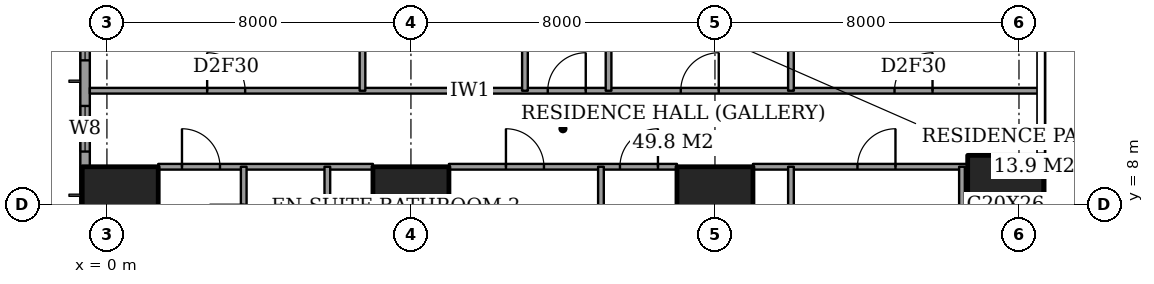
"""IFC4 building model, lengths in metres.
Left out: names, types, materials, properties, quantities, classifications, styles, units other than length and angle.
Written with IfcOpenShell. Run it as: python <this file> out.ifc"""

import sys

from ifc_helpers import new_model, si_unit, direction, frame, frame_2d, origin, origin_2d, place, context, subcontext, project, spatial, rectangle, extrude, element, fill, save


model = new_model("IFC4")
c1 = context("Model", 3, precision=1e-05, world=origin(), true_north=direction((0.0, 1.0)))
c2 = subcontext(c1, "Body", "Model", "MODEL_VIEW")
j1 = project(units=[si_unit("LENGTHUNIT", "METRE"), si_unit("PLANEANGLEUNIT", "RADIAN")], contexts=[c1])
p1 = place(None, origin())
s1 = spatial("IfcSite", under=j1, at=p1, CompositionType="ELEMENT")
p2 = place(p1, origin())
s2 = spatial("IfcBuilding", under=s1, at=p2, CompositionType="ELEMENT")
p3 = place(p2, frame((0.0, 0.0, 76.4)))
s3 = spatial("IfcBuildingStorey", under=s2, at=p3, CompositionType="ELEMENT", Elevation=76.4)
for number, where, z_axis, x_axis in (
    (1, (0.35, 8.0, 0.0), (0.0, 0.0, 1.0), (1.0, 0.0, 0.0)),
    (2, (8.0, 8.0, 0.0), (0.0, 0.0, 1.0), (1.0, 0.0, 0.0)),
    (3, (16.0, 8.0, 0.0), (0.0, 0.0, 1.0), (1.0, 0.0, 0.0)),
):
    element("IfcColumn", number, at=place(p3, frame(where, z_axis=z_axis, x_axis=x_axis)), inside=s3, PredefinedType="COLUMN", context=c2, shape_type="SweptSolid", body=[
        extrude(rectangle(XDim=2.0, YDim=2.0, at=origin_2d()), origin(), (0.0, 0.0, 1.0), 3.6),
    ])
p4 = place(p3, frame((23.65, 8.0, 0.0), z_axis=(0.0, 0.0, 1.0), x_axis=(1.0, 0.0, 0.0)))
e4 = element("IfcColumn", 4, at=p4, inside=s3, PredefinedType="COLUMN", context=c2, shape_type="SweptSolid", body=[
    extrude(rectangle(XDim=2.0, YDim=2.6, at=origin_2d()), origin(), (0.0, 0.0, 1.0), 3.6),
])
p5 = place(p3, frame((-0.575, 44.825, 0.0), z_axis=(0.0, 0.0, 1.0), x_axis=(0.0, -1.0, 0.0)))
e5 = element("IfcWall", 5, at=p5, inside=s3, PredefinedType="SOLIDWALL", context=c2, shape_type="SweptSolid", body=[
    extrude(rectangle(XDim=41.65, YDim=0.25, at=frame_2d((20.825, 0.0))), origin(), (0.0, 0.0, 1.0), 3.6),
])
p6 = place(p5, frame((0.775, 0.0, 0.6)))
e6 = element("IfcOpeningElement", 6, at=p6, cuts=e5, PredefinedType="OPENING", context=c2, shape_type="SweptSolid", body=[
    extrude(rectangle(XDim=2.4, YDim=2.0, at=frame_2d((1.2, 1.0))), frame((0.0, 0.135, 0.0), z_axis=(0.0, -1.0, 0.0), x_axis=(1.0, 0.0, 0.0)), (0.0, 0.0, 1.0), 0.27),
])
p7 = place(p5, frame((6.1, 0.0, 0.6)))
e7 = element("IfcOpeningElement", 7, at=p7, cuts=e5, PredefinedType="OPENING", context=c2, shape_type="SweptSolid", body=[
    extrude(rectangle(XDim=1.2, YDim=2.0, at=frame_2d((0.6, 1.0))), frame((0.0, 0.135, 0.0), z_axis=(0.0, -1.0, 0.0), x_axis=(1.0, 0.0, 0.0)), (0.0, 0.0, 1.0), 0.27),
])
p8 = place(p5, frame((8.425, 0.0, 0.6)))
e8 = element("IfcOpeningElement", 8, at=p8, cuts=e5, PredefinedType="OPENING", context=c2, shape_type="SweptSolid", body=[
    extrude(rectangle(XDim=2.4, YDim=2.0, at=frame_2d((1.2, 1.0))), frame((0.0, 0.135, 0.0), z_axis=(0.0, -1.0, 0.0), x_axis=(1.0, 0.0, 0.0)), (0.0, 0.0, 1.0), 0.27),
])
p9 = place(p5, frame((15.625, 0.0, 0.6)))
e9 = element("IfcOpeningElement", 9, at=p9, cuts=e5, PredefinedType="OPENING", context=c2, shape_type="SweptSolid", body=[
    extrude(rectangle(XDim=2.4, YDim=2.0, at=frame_2d((1.2, 1.0))), frame((0.0, 0.135, 0.0), z_axis=(0.0, -1.0, 0.0), x_axis=(1.0, 0.0, 0.0)), (0.0, 0.0, 1.0), 0.27),
])
p10 = place(p5, frame((23.625, 0.0, 0.6)))
e10 = element("IfcOpeningElement", 10, at=p10, cuts=e5, PredefinedType="OPENING", context=c2, shape_type="SweptSolid", body=[
    extrude(rectangle(XDim=2.4, YDim=2.0, at=frame_2d((1.2, 1.0))), frame((0.0, 0.135, 0.0), z_axis=(0.0, -1.0, 0.0), x_axis=(1.0, 0.0, 0.0)), (0.0, 0.0, 1.0), 0.27),
])
p11 = place(p5, frame((30.625, 0.0, 0.6)))
e11 = element("IfcOpeningElement", 11, at=p11, cuts=e5, PredefinedType="OPENING", context=c2, shape_type="SweptSolid", body=[
    extrude(rectangle(XDim=2.4, YDim=2.0, at=frame_2d((1.2, 1.0))), frame((0.0, 0.135, 0.0), z_axis=(0.0, -1.0, 0.0), x_axis=(1.0, 0.0, 0.0)), (0.0, 0.0, 1.0), 0.27),
])
p12 = place(p5, frame((34.225, 0.0, 0.6)))
e12 = element("IfcOpeningElement", 12, at=p12, cuts=e5, PredefinedType="OPENING", context=c2, shape_type="SweptSolid", body=[
    extrude(rectangle(XDim=1.2, YDim=2.0, at=frame_2d((0.6, 1.0))), frame((0.0, 0.135, 0.0), z_axis=(0.0, -1.0, 0.0), x_axis=(1.0, 0.0, 0.0)), (0.0, 0.0, 1.0), 0.27),
])
p13 = place(p5, frame((38.475, 0.0, 0.6)))
e13 = element("IfcOpeningElement", 13, at=p13, cuts=e5, PredefinedType="OPENING", context=c2, shape_type="SweptSolid", body=[
    extrude(rectangle(XDim=2.4, YDim=2.0, at=frame_2d((1.2, 1.0))), frame((0.0, 0.135, 0.0), z_axis=(0.0, -1.0, 0.0), x_axis=(1.0, 0.0, 0.0)), (0.0, 0.0, 1.0), 0.27),
])
p14 = place(p3, frame((1.35, 9.0, 0.0), z_axis=(0.0, 0.0, 1.0), x_axis=(1.0, 0.0, 0.0)))
e14 = element("IfcWall", 14, at=p14, inside=s3, PredefinedType="PARTITIONING", context=c2, shape_type="SweptSolid", body=[
    extrude(rectangle(XDim=5.65, YDim=0.15, at=frame_2d((2.825, 0.0))), origin(), (0.0, 0.0, 1.0), 3.35),
])
p15 = place(p14, frame((0.625, 0.0, 0.0)))
e15 = element("IfcOpeningElement", 15, at=p15, cuts=e14, PredefinedType="OPENING", context=c2, shape_type="SweptSolid", body=[
    extrude(rectangle(XDim=1.0, YDim=2.1, at=frame_2d((0.5, 1.05))), frame((0.0, 0.085, 0.0), z_axis=(0.0, -1.0, 0.0), x_axis=(1.0, 0.0, 0.0)), (0.0, 0.0, 1.0), 0.17),
])
p16 = place(p3, frame((9.0, 9.0, 0.0), z_axis=(0.0, 0.0, 1.0), x_axis=(1.0, 0.0, 0.0)))
e16 = element("IfcWall", 16, at=p16, inside=s3, PredefinedType="PARTITIONING", context=c2, shape_type="SweptSolid", body=[
    extrude(rectangle(XDim=6.0, YDim=0.15, at=frame_2d((3.0, 0.0))), origin(), (0.0, 0.0, 1.0), 3.35),
])
p17 = place(p16, frame((1.5, 0.0, 0.0)))
e17 = element("IfcOpeningElement", 17, at=p17, cuts=e16, PredefinedType="OPENING", context=c2, shape_type="SweptSolid", body=[
    extrude(rectangle(XDim=1.0, YDim=2.1, at=frame_2d((0.5, 1.05))), frame((0.0, 0.085, 0.0), z_axis=(0.0, -1.0, 0.0), x_axis=(1.0, 0.0, 0.0)), (0.0, 0.0, 1.0), 0.17),
])
p18 = place(p16, frame((4.5, 0.0, 0.0)))
e18 = element("IfcOpeningElement", 18, at=p18, cuts=e16, PredefinedType="OPENING", context=c2, shape_type="SweptSolid", body=[
    extrude(rectangle(XDim=1.0, YDim=2.1, at=frame_2d((0.5, 1.05))), frame((0.0, 0.085, 0.0), z_axis=(0.0, -1.0, 0.0), x_axis=(1.0, 0.0, 0.0)), (0.0, 0.0, 1.0), 0.17),
])
p19 = place(p3, frame((17.0, 9.0, 0.0), z_axis=(0.0, 0.0, 1.0), x_axis=(1.0, 0.0, 0.0)))
e19 = element("IfcWall", 19, at=p19, inside=s3, PredefinedType="PARTITIONING", context=c2, shape_type="SweptSolid", body=[
    extrude(rectangle(XDim=5.65, YDim=0.15, at=frame_2d((2.825, 0.0))), origin(), (0.0, 0.0, 1.0), 3.35),
])
p20 = place(p19, frame((2.75, 0.0, 0.0)))
e20 = element("IfcOpeningElement", 20, at=p20, cuts=e19, PredefinedType="OPENING", context=c2, shape_type="SweptSolid", body=[
    extrude(rectangle(XDim=1.0, YDim=2.1, at=frame_2d((0.5, 1.05))), frame((0.0, 0.085, 0.0), z_axis=(0.0, -1.0, 0.0), x_axis=(1.0, 0.0, 0.0)), (0.0, 0.0, 1.0), 0.17),
])
p21 = place(p3, frame((-0.45, 11.0, 0.0), z_axis=(0.0, 0.0, 1.0), x_axis=(1.0, 0.0, 0.0)))
e21 = element("IfcWall", 21, at=p21, inside=s3, PredefinedType="PARTITIONING", context=c2, shape_type="SweptSolid", body=[
    extrude(rectangle(XDim=25.011, YDim=0.15, at=frame_2d((12.505, 0.0))), origin(), (0.0, 0.0, 1.0), 3.35),
])
p22 = place(p21, frame((12.05, 0.0, 0.0)))
e22 = element("IfcOpeningElement", 22, at=p22, cuts=e21, PredefinedType="OPENING", context=c2, shape_type="SweptSolid", body=[
    extrude(rectangle(XDim=1.0, YDim=2.1, at=frame_2d((0.5, 1.05))), frame((0.0, 0.085, 0.0), z_axis=(0.0, -1.0, 0.0), x_axis=(1.0, 0.0, 0.0)), (0.0, 0.0, 1.0), 0.17),
])
p23 = place(p21, frame((3.087, 0.0, 0.0)))
e23 = element("IfcOpeningElement", 23, at=p23, cuts=e21, PredefinedType="OPENING", context=c2, shape_type="SweptSolid", body=[
    extrude(rectangle(XDim=1.0, YDim=2.1, at=frame_2d((0.5, 1.05))), frame((0.0, 0.085, 0.0), z_axis=(0.0, -1.0, 0.0), x_axis=(1.0, 0.0, 0.0)), (0.0, 0.0, 1.0), 0.17),
])
p24 = place(p21, frame((15.55, 0.0, 0.0)))
e24 = element("IfcOpeningElement", 24, at=p24, cuts=e21, PredefinedType="OPENING", context=c2, shape_type="SweptSolid", body=[
    extrude(rectangle(XDim=1.0, YDim=2.1, at=frame_2d((0.5, 1.05))), frame((0.0, 0.085, 0.0), z_axis=(0.0, -1.0, 0.0), x_axis=(1.0, 0.0, 0.0)), (0.0, 0.0, 1.0), 0.17),
])
p25 = place(p21, frame((21.175, 0.0, 0.0)))
e25 = element("IfcOpeningElement", 25, at=p25, cuts=e21, PredefinedType="OPENING", context=c2, shape_type="SweptSolid", body=[
    extrude(rectangle(XDim=1.0, YDim=2.1, at=frame_2d((0.5, 1.05))), frame((0.0, 0.085, 0.0), z_axis=(0.0, -1.0, 0.0), x_axis=(1.0, 0.0, 0.0)), (0.0, 0.0, 1.0), 0.17),
])
p26 = place(p3, frame((3.6, 6.1, 0.0), z_axis=(0.0, 0.0, 1.0), x_axis=(0.0, 1.0, 0.0)))
e26 = element("IfcWall", 26, at=p26, inside=s3, PredefinedType="PARTITIONING", context=c2, shape_type="SweptSolid", body=[
    extrude(rectangle(XDim=2.9, YDim=0.15, at=frame_2d((1.45, 0.0))), origin(), (0.0, 0.0, 1.0), 3.35),
])
p27 = place(p26, frame((1.0, 0.0, 0.0)))
e27 = element("IfcOpeningElement", 27, at=p27, cuts=e26, PredefinedType="OPENING", context=c2, shape_type="SweptSolid", body=[
    extrude(rectangle(XDim=0.9, YDim=2.1, at=frame_2d((0.45, 1.05))), frame((0.0, 0.085, 0.0), z_axis=(0.0, -1.0, 0.0), x_axis=(1.0, 0.0, 0.0)), (0.0, 0.0, 1.0), 0.17),
])
p28 = place(p3, frame((5.8, -0.45, 0.0), z_axis=(0.0, 0.0, 1.0), x_axis=(0.0, 1.0, 0.0)))
e28 = element("IfcWall", 28, at=p28, inside=s3, PredefinedType="PARTITIONING", context=c2, shape_type="SweptSolid", body=[
    extrude(rectangle(XDim=9.45, YDim=0.15, at=frame_2d((4.725, 0.0))), origin(), (0.0, 0.0, 1.0), 3.35),
])
p29 = place(p3, frame((6.725, 11.0, 0.0), z_axis=(0.0, 0.0, 1.0), x_axis=(0.0, 1.0, 0.0)))
e29 = element("IfcWall", 29, at=p29, inside=s3, PredefinedType="PARTITIONING", context=c2, shape_type="SweptSolid", body=[
    extrude(rectangle(XDim=3.8, YDim=0.15, at=frame_2d((1.9, 0.0))), origin(), (0.0, 0.0, 1.0), 3.35),
])
p30 = place(p29, frame((1.15, 0.0, 0.0)))
e30 = element("IfcOpeningElement", 30, at=p30, cuts=e29, PredefinedType="OPENING", context=c2, shape_type="SweptSolid", body=[
    extrude(rectangle(XDim=0.9, YDim=2.1, at=frame_2d((0.45, 1.05))), frame((0.0, 0.085, 0.0), z_axis=(0.0, -1.0, 0.0), x_axis=(1.0, 0.0, 0.0)), (0.0, 0.0, 1.0), 0.17),
])
p31 = place(p3, frame((11.0, 11.0, 0.0), z_axis=(0.0, 0.0, 1.0), x_axis=(0.0, 1.0, 0.0)))
e31 = element("IfcWall", 31, at=p31, inside=s3, PredefinedType="PARTITIONING", context=c2, shape_type="SweptSolid", body=[
    extrude(rectangle(XDim=10.6, YDim=0.15, at=frame_2d((5.3, 0.0))), origin(), (0.0, 0.0, 1.0), 3.35),
])
p32 = place(p31, frame((7.962, 0.0, 0.0)))
e32 = element("IfcOpeningElement", 32, at=p32, cuts=e31, PredefinedType="OPENING", context=c2, shape_type="SweptSolid", body=[
    extrude(rectangle(XDim=1.0, YDim=2.1, at=frame_2d((0.5, 1.05))), frame((0.0, 0.085, 0.0), z_axis=(0.0, -1.0, 0.0), x_axis=(1.0, 0.0, 0.0)), (0.0, 0.0, 1.0), 0.17),
])
p33 = place(p3, frame((13.0, -0.45, 0.0), z_axis=(0.0, 0.0, 1.0), x_axis=(0.0, 1.0, 0.0)))
e33 = element("IfcWall", 33, at=p33, inside=s3, PredefinedType="PARTITIONING", context=c2, shape_type="SweptSolid", body=[
    extrude(rectangle(XDim=9.45, YDim=0.15, at=frame_2d((4.725, 0.0))), origin(), (0.0, 0.0, 1.0), 3.35),
])
p34 = place(p3, frame((13.2, 11.0, 0.0), z_axis=(0.0, 0.0, 1.0), x_axis=(0.0, 1.0, 0.0)))
e34 = element("IfcWall", 34, at=p34, inside=s3, PredefinedType="PARTITIONING", context=c2, shape_type="SweptSolid", body=[
    extrude(rectangle(XDim=6.325, YDim=0.15, at=frame_2d((3.163, 0.0))), origin(), (0.0, 0.0, 1.0), 3.35),
])
p35 = place(p3, frame((18.0, -0.45, 0.0), z_axis=(0.0, 0.0, 1.0), x_axis=(0.0, 1.0, 0.0)))
e35 = element("IfcWall", 35, at=p35, inside=s3, PredefinedType="PARTITIONING", context=c2, shape_type="SweptSolid", body=[
    extrude(rectangle(XDim=9.45, YDim=0.15, at=frame_2d((4.725, 0.0))), origin(), (0.0, 0.0, 1.0), 3.35),
])
p36 = place(p3, frame((18.0, 11.0, 0.0), z_axis=(0.0, 0.0, 1.0), x_axis=(0.0, 1.0, 0.0)))
e36 = element("IfcWall", 36, at=p36, inside=s3, PredefinedType="PARTITIONING", context=c2, shape_type="SweptSolid", body=[
    extrude(rectangle(XDim=6.325, YDim=0.15, at=frame_2d((3.163, 0.0))), origin(), (0.0, 0.0, 1.0), 3.35),
])
p37 = place(p3, frame((22.5, -0.45, 0.0), z_axis=(0.0, 0.0, 1.0), x_axis=(0.0, 1.0, 0.0)))
e37 = element("IfcWall", 37, at=p37, inside=s3, PredefinedType="PARTITIONING", context=c2, shape_type="SweptSolid", body=[
    extrude(rectangle(XDim=9.45, YDim=0.15, at=frame_2d((4.725, 0.0))), origin(), (0.0, 0.0, 1.0), 3.35),
])
p38 = place(p37, frame((4.275, 0.0, 0.0)))
e38 = element("IfcOpeningElement", 38, at=p38, cuts=e37, PredefinedType="OPENING", context=c2, shape_type="SweptSolid", body=[
    extrude(rectangle(XDim=0.9, YDim=2.1, at=frame_2d((0.45, 1.05))), frame((0.0, 0.085, 0.0), z_axis=(0.0, -1.0, 0.0), x_axis=(1.0, 0.0, 0.0)), (0.0, 0.0, 1.0), 0.17),
])
p39 = place(p11, origin())
e39 = element("IfcWindow", 39, at=p39, inside=s3, PartitioningType="SINGLE_PANEL", PredefinedType="WINDOW", context=c2, shape_type="SweptSolid", body=[
    extrude(rectangle(XDim=2.4, YDim=2.0, at=frame_2d((1.2, 1.0))), frame((0.0, 0.03, 0.0), z_axis=(0.0, -1.0, 0.0), x_axis=(1.0, 0.0, 0.0)), (0.0, 0.0, 1.0), 0.06),
])
fill(e11, e39)
p40 = place(p12, origin())
e40 = element("IfcWindow", 40, at=p40, inside=s3, PartitioningType="SINGLE_PANEL", PredefinedType="WINDOW", context=c2, shape_type="SweptSolid", body=[
    extrude(rectangle(XDim=1.2, YDim=2.0, at=frame_2d((0.6, 1.0))), frame((0.0, 0.03, 0.0), z_axis=(0.0, -1.0, 0.0), x_axis=(1.0, 0.0, 0.0)), (0.0, 0.0, 1.0), 0.06),
])
fill(e12, e40)
p41 = place(p15, origin())
e41 = element("IfcDoor", 41, at=p41, inside=s3, OperationType="SINGLE_SWING_RIGHT", PredefinedType="DOOR", context=c2, shape_type="SweptSolid", body=[
    extrude(rectangle(XDim=1.0, YDim=2.1, at=frame_2d((0.5, 1.05))), frame((0.0, 0.025, 0.0), z_axis=(0.0, -1.0, 0.0), x_axis=(1.0, 0.0, 0.0)), (0.0, 0.0, 1.0), 0.05),
])
fill(e15, e41)
p42 = place(p17, origin())
e42 = element("IfcDoor", 42, at=p42, inside=s3, OperationType="SINGLE_SWING_RIGHT", PredefinedType="DOOR", context=c2, shape_type="SweptSolid", body=[
    extrude(rectangle(XDim=1.0, YDim=2.1, at=frame_2d((0.5, 1.05))), frame((0.0, 0.025, 0.0), z_axis=(0.0, -1.0, 0.0), x_axis=(1.0, 0.0, 0.0)), (0.0, 0.0, 1.0), 0.05),
])
fill(e17, e42)
p43 = place(p18, origin())
e43 = element("IfcDoor", 43, at=p43, inside=s3, OperationType="SINGLE_SWING_LEFT", PredefinedType="DOOR", context=c2, shape_type="SweptSolid", body=[
    extrude(rectangle(XDim=1.0, YDim=2.1, at=frame_2d((0.5, 1.05))), frame((0.0, 0.025, 0.0), z_axis=(0.0, -1.0, 0.0), x_axis=(1.0, 0.0, 0.0)), (0.0, 0.0, 1.0), 0.05),
])
fill(e18, e43)
p44 = place(p20, origin())
e44 = element("IfcDoor", 44, at=p44, inside=s3, OperationType="SINGLE_SWING_LEFT", PredefinedType="DOOR", context=c2, shape_type="SweptSolid", body=[
    extrude(rectangle(XDim=1.0, YDim=2.1, at=frame_2d((0.5, 1.05))), frame((0.0, 0.025, 0.0), z_axis=(0.0, -1.0, 0.0), x_axis=(1.0, 0.0, 0.0)), (0.0, 0.0, 1.0), 0.05),
])
fill(e20, e44)
p45 = place(p22, origin())
e45 = element("IfcDoor", 45, at=p45, inside=s3, OperationType="SINGLE_SWING_LEFT", PredefinedType="DOOR", context=c2, shape_type="SweptSolid", body=[
    extrude(rectangle(XDim=1.0, YDim=2.1, at=frame_2d((0.5, 1.05))), frame((0.0, 0.025, 0.0), z_axis=(0.0, -1.0, 0.0), x_axis=(1.0, 0.0, 0.0)), (0.0, 0.0, 1.0), 0.05),
])
fill(e22, e45)
p46 = place(p23, origin())
e46 = element("IfcDoor", 46, at=p46, inside=s3, OperationType="SINGLE_SWING_RIGHT", PredefinedType="DOOR", context=c2, shape_type="SweptSolid", body=[
    extrude(rectangle(XDim=1.0, YDim=2.1, at=frame_2d((0.5, 1.05))), frame((0.0, 0.025, 0.0), z_axis=(0.0, -1.0, 0.0), x_axis=(1.0, 0.0, 0.0)), (0.0, 0.0, 1.0), 0.05),
])
fill(e23, e46)
p47 = place(p24, origin())
e47 = element("IfcDoor", 47, at=p47, inside=s3, OperationType="SINGLE_SWING_LEFT", PredefinedType="DOOR", context=c2, shape_type="SweptSolid", body=[
    extrude(rectangle(XDim=1.0, YDim=2.1, at=frame_2d((0.5, 1.05))), frame((0.0, 0.025, 0.0), z_axis=(0.0, -1.0, 0.0), x_axis=(1.0, 0.0, 0.0)), (0.0, 0.0, 1.0), 0.05),
])
fill(e24, e47)
p48 = place(p25, origin())
e48 = element("IfcDoor", 48, at=p48, inside=s3, OperationType="SINGLE_SWING_LEFT", PredefinedType="DOOR", context=c2, shape_type="SweptSolid", body=[
    extrude(rectangle(XDim=1.0, YDim=2.1, at=frame_2d((0.5, 1.05))), frame((0.0, 0.025, 0.0), z_axis=(0.0, -1.0, 0.0), x_axis=(1.0, 0.0, 0.0)), (0.0, 0.0, 1.0), 0.05),
])
fill(e25, e48)
save(model, sys.argv[1])
